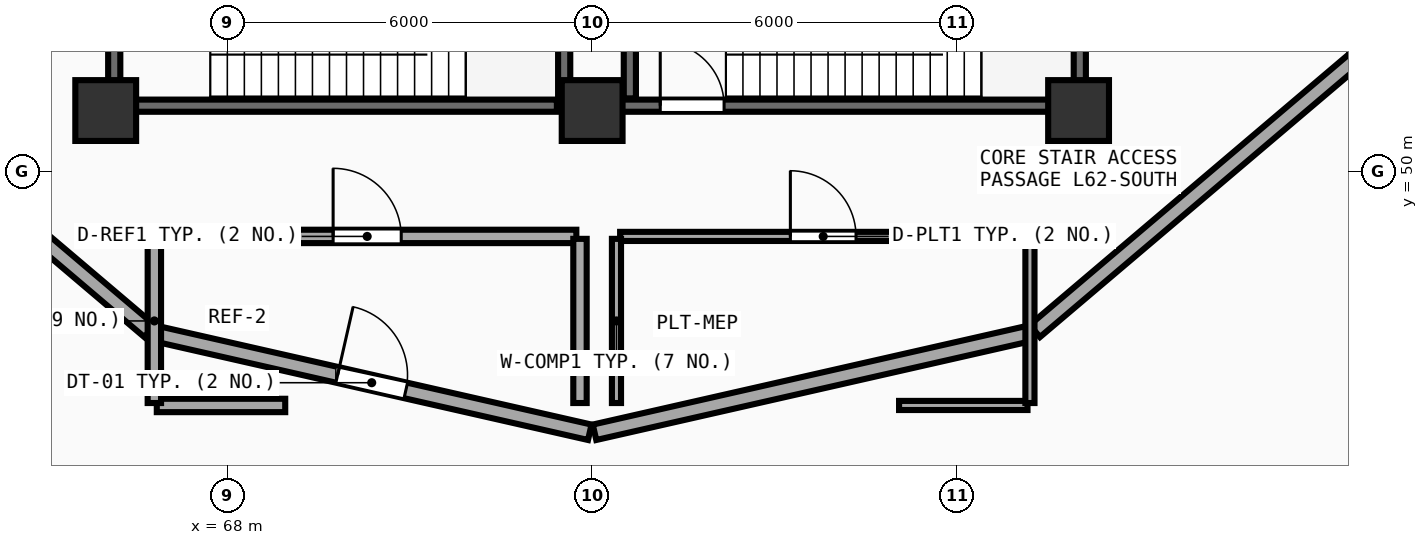
"""IFC4 building model, lengths in metres.
Left out: names, types, materials, properties, quantities, classifications, styles, units other than length and angle.
Written with IfcOpenShell. Run it as: python <this file> out.ifc"""

import sys

from ifc_helpers import new_model, si_unit, direction, frame, frame_2d, origin, origin_2d, place, context, subcontext, project, spatial, rectangle, extrude, element, fill, save


model = new_model("IFC4")
c1 = context("Model", 3, precision=1e-05, world=origin(), true_north=direction((0.0, 1.0)))
c2 = subcontext(c1, "Body", "Model", "MODEL_VIEW")
j1 = project(units=[si_unit("LENGTHUNIT", "METRE"), si_unit("PLANEANGLEUNIT", "RADIAN")], contexts=[c1])
p1 = place(None, origin())
s1 = spatial("IfcSite", under=j1, at=p1, CompositionType="ELEMENT")
p2 = place(p1, origin())
s2 = spatial("IfcBuilding", under=s1, at=p2, CompositionType="ELEMENT")
p3 = place(p2, frame((0.0, 0.0, 242.96)))
s3 = spatial("IfcBuildingStorey", under=s2, at=p3, CompositionType="ELEMENT", Elevation=242.96)
for number, where, z_axis, x_axis in (
    (1, (66.0, 51.0, 0.0), (0.0, 0.0, 1.0), (1.0, 0.0, 0.0)),
    (2, (74.0, 51.0, 0.0), (0.0, 0.0, 1.0), (1.0, 0.0, 0.0)),
    (3, (82.0, 51.0, 0.0), (0.0, 0.0, 1.0), (1.0, 0.0, 0.0)),
):
    element("IfcColumn", number, at=place(p3, frame(where, z_axis=z_axis, x_axis=x_axis)), inside=s3, PredefinedType="PILASTER", context=c2, shape_type="SweptSolid", body=[
        extrude(rectangle(XDim=1.0, YDim=1.0, at=origin_2d()), origin(), (0.0, 0.0, 1.0), 5.74),
    ])
p4 = place(p3, frame((61.473, 51.824, 0.0), z_axis=(0.0, 0.0, 1.0), x_axis=(0.762580748943, -0.646893037018, 0.0)))
e4 = element("IfcWall", 4, at=p4, inside=s3, PredefinedType="SOLIDWALL", context=c2, shape_type="SweptSolid", body=[
    extrude(rectangle(XDim=6.88, YDim=0.26, at=frame_2d((3.44, 0.0))), origin(), (0.0, 0.0, 1.0), 5.06),
])
p5 = place(p3, frame((66.789, 47.339, 0.0), z_axis=(0.0, 0.0, 1.0), x_axis=(0.975128290494, -0.221641189938, 0.0)))
e5 = element("IfcWall", 5, at=p5, inside=s3, PredefinedType="SOLIDWALL", context=c2, shape_type="SweptSolid", body=[
    extrude(rectangle(XDim=7.355, YDim=0.26, at=frame_2d((3.677, 0.0))), origin(), (0.0, 0.0, 1.0), 5.06),
])
p6 = place(p5, frame((3.102, 0.0, 0.0)))
e6 = element("IfcOpeningElement", 6, at=p6, cuts=e5, PredefinedType="OPENING", context=c2, shape_type="SweptSolid", body=[
    extrude(rectangle(XDim=1.15, YDim=2.15, at=frame_2d((0.575, 1.075))), frame((0.0, 0.14, 0.0), z_axis=(0.0, -1.0, 0.0), x_axis=(1.0, 0.0, 0.0)), (0.0, 0.0, 1.0), 0.28),
])
p7 = place(p3, frame((74.039, 45.709, 0.0), z_axis=(0.0, 0.0, 1.0), x_axis=(0.975128290494, 0.221641189938, 0.0)))
e7 = element("IfcWall", 7, at=p7, inside=s3, PredefinedType="SOLIDWALL", context=c2, shape_type="SweptSolid", body=[
    extrude(rectangle(XDim=7.355, YDim=0.26, at=frame_2d((3.677, 0.0))), origin(), (0.0, 0.0, 1.0), 5.06),
])
p8 = place(p3, frame((81.281, 47.374, 0.0), z_axis=(0.0, 0.0, 1.0), x_axis=(0.762580748943, 0.646893037018, 0.0)))
e8 = element("IfcWall", 8, at=p8, inside=s3, PredefinedType="SOLIDWALL", context=c2, shape_type="SweptSolid", body=[
    extrude(rectangle(XDim=6.88, YDim=0.26, at=frame_2d((3.44, 0.0))), origin(), (0.0, 0.0, 1.0), 5.06),
])
p9 = place(p3, frame((74.0, 51.08, 0.0), z_axis=(0.0, 0.0, 1.0), x_axis=(1.0, 0.0, 0.0)))
e9 = element("IfcWall", 9, at=p9, inside=s3, PredefinedType="SHEAR", context=c2, shape_type="SweptSolid", body=[
    extrude(rectangle(XDim=7.9, YDim=0.2, at=frame_2d((3.95, 0.0))), origin(), (0.0, 0.0, 1.0), 5.48),
])
p10 = place(p9, frame((1.12, 0.0, 0.0)))
e10 = element("IfcOpeningElement", 10, at=p10, cuts=e9, PredefinedType="OPENING", context=c2, shape_type="SweptSolid", body=[
    extrude(rectangle(XDim=1.05, YDim=2.1, at=frame_2d((0.525, 1.05))), frame((0.0, 0.11, 0.0), z_axis=(0.0, -1.0, 0.0), x_axis=(1.0, 0.0, 0.0)), (0.0, 0.0, 1.0), 0.22),
])
for number, where, z_axis, x_axis in (
    (11, (82.02, 51.2, 0.0), (0.0, 0.0, 1.0), (0.0, 1.0, 0.0)),
    (12, (74.62, 54.27, 0.0), (0.0, 0.0, 1.0), (0.0, -1.0, 0.0)),
):
    element("IfcWall", number, at=place(p3, frame(where, z_axis=z_axis, x_axis=x_axis)), inside=s3, PredefinedType="SHEAR", context=c2, shape_type="SweptSolid", body=[
        extrude(rectangle(XDim=3.07, YDim=0.2, at=frame_2d((1.535, 0.0))), origin(), (0.0, 0.0, 1.0), 5.48),
    ])
p11 = place(p3, frame((66.26, 51.08, 0.0), z_axis=(0.0, 0.0, 1.0), x_axis=(1.0, 0.0, 0.0)))
e13 = element("IfcWall", 13, at=p11, inside=s3, PredefinedType="SHEAR", context=c2, shape_type="SweptSolid", body=[
    extrude(rectangle(XDim=7.16, YDim=0.2, at=frame_2d((3.58, 0.0))), origin(), (0.0, 0.0, 1.0), 5.48),
])
p12 = place(p3, frame((73.54, 51.2, 0.0), z_axis=(0.0, 0.0, 1.0), x_axis=(0.0, 1.0, 0.0)))
e14 = element("IfcWall", 14, at=p12, inside=s3, PredefinedType="SHEAR", context=c2, shape_type="SweptSolid", body=[
    extrude(rectangle(XDim=3.07, YDim=0.2, at=frame_2d((1.535, 0.0))), origin(), (0.0, 0.0, 1.0), 5.48),
])
p13 = place(p3, frame((66.14, 54.27, 0.0), z_axis=(0.0, 0.0, 1.0), x_axis=(0.0, -1.0, 0.0)))
e15 = element("IfcWall", 15, at=p13, inside=s3, PredefinedType="SHEAR", context=c2, shape_type="SweptSolid", body=[
    extrude(rectangle(XDim=3.07, YDim=0.2, at=frame_2d((1.535, 0.0))), origin(), (0.0, 0.0, 1.0), 5.48),
])
p14 = place(p13, frame((1.01, 0.0, 0.0)))
e16 = element("IfcOpeningElement", 16, at=p14, cuts=e15, PredefinedType="OPENING", context=c2, shape_type="SweptSolid", body=[
    extrude(rectangle(XDim=1.05, YDim=2.1, at=frame_2d((0.525, 1.05))), frame((0.0, 0.11, 0.0), z_axis=(0.0, -1.0, 0.0), x_axis=(1.0, 0.0, 0.0)), (0.0, 0.0, 1.0), 0.22),
])
p15 = place(p3, frame((66.86, 48.93, 0.0), z_axis=(0.0, 0.0, 1.0), x_axis=(1.0, 0.0, 0.0)))
e17 = element("IfcWall", 17, at=p15, inside=s3, PredefinedType="SOLIDWALL", context=c2, shape_type="SweptSolid", body=[
    extrude(rectangle(XDim=6.88, YDim=0.22, at=frame_2d((3.44, 0.0))), origin(), (0.0, 0.0, 1.0), 5.065),
])
p16 = place(p15, frame((2.88, 0.0, 0.0)))
e18 = element("IfcOpeningElement", 18, at=p16, cuts=e17, PredefinedType="OPENING", context=c2, shape_type="SweptSolid", body=[
    extrude(rectangle(XDim=1.12, YDim=2.1, at=frame_2d((0.56, 1.05))), frame((0.0, 0.12, 0.0), z_axis=(0.0, -1.0, 0.0), x_axis=(1.0, 0.0, 0.0)), (0.0, 0.0, 1.0), 0.24),
])
p17 = place(p3, frame((74.46, 48.93, 0.0), z_axis=(0.0, 0.0, 1.0), x_axis=(1.0, 0.0, 0.0)))
e19 = element("IfcWall", 19, at=p17, inside=s3, PredefinedType="PARTITIONING", context=c2, shape_type="SweptSolid", body=[
    extrude(rectangle(XDim=6.68, YDim=0.15, at=frame_2d((3.34, 0.0))), origin(), (0.0, 0.0, 1.0), 5.065),
])
p18 = place(p17, frame((2.8, 0.0, 0.0)))
e20 = element("IfcOpeningElement", 20, at=p18, cuts=e19, PredefinedType="OPENING", context=c2, shape_type="SweptSolid", body=[
    extrude(rectangle(XDim=1.08, YDim=2.1, at=frame_2d((0.54, 1.05))), frame((0.0, 0.085, 0.0), z_axis=(0.0, -1.0, 0.0), x_axis=(1.0, 0.0, 0.0)), (0.0, 0.0, 1.0), 0.17),
])
p19 = place(p3, frame((66.84, 46.15, 0.0), z_axis=(0.0, 0.0, 1.0), x_axis=(1.0, 0.0, 0.0)))
e21 = element("IfcWall", 21, at=p19, inside=s3, PredefinedType="SOLIDWALL", context=c2, shape_type="SweptSolid", body=[
    extrude(rectangle(XDim=2.112, YDim=0.22, at=frame_2d((1.056, 0.0))), origin(), (0.0, 0.0, 1.0), 5.165),
])
p20 = place(p3, frame((73.8, 46.19, 0.0), z_axis=(0.0, 0.0, 1.0), x_axis=(0.0, 1.0, 0.0)))
e22 = element("IfcWall", 22, at=p20, inside=s3, PredefinedType="SOLIDWALL", context=c2, shape_type="SweptSolid", body=[
    extrude(rectangle(XDim=2.7, YDim=0.22, at=frame_2d((1.35, 0.0))), origin(), (0.0, 0.0, 1.0), 5.225),
])
p21 = place(p3, frame((66.8, 48.89, 0.0), z_axis=(0.0, 0.0, 1.0), x_axis=(0.0, -1.0, 0.0)))
e23 = element("IfcWall", 23, at=p21, inside=s3, PredefinedType="SOLIDWALL", context=c2, shape_type="SweptSolid", body=[
    extrude(rectangle(XDim=2.7, YDim=0.22, at=frame_2d((1.35, 0.0))), origin(), (0.0, 0.0, 1.0), 5.165),
])
p22 = place(p3, frame((79.048, 46.15, 0.0), z_axis=(0.0, 0.0, 1.0), x_axis=(1.0, 0.0, 0.0)))
e24 = element("IfcWall", 24, at=p22, inside=s3, PredefinedType="PARTITIONING", context=c2, shape_type="SweptSolid", body=[
    extrude(rectangle(XDim=2.112, YDim=0.15, at=frame_2d((1.056, 0.0))), origin(), (0.0, 0.0, 1.0), 5.165),
])
p23 = place(p3, frame((81.2, 46.19, 0.0), z_axis=(0.0, 0.0, 1.0), x_axis=(0.0, 1.0, 0.0)))
e25 = element("IfcWall", 25, at=p23, inside=s3, PredefinedType="PARTITIONING", context=c2, shape_type="SweptSolid", body=[
    extrude(rectangle(XDim=2.7, YDim=0.15, at=frame_2d((1.35, 0.0))), origin(), (0.0, 0.0, 1.0), 5.165),
])
p24 = place(p3, frame((74.4, 48.89, 0.0), z_axis=(0.0, 0.0, 1.0), x_axis=(0.0, -1.0, 0.0)))
e26 = element("IfcWall", 26, at=p24, inside=s3, PredefinedType="PARTITIONING", context=c2, shape_type="SweptSolid", body=[
    extrude(rectangle(XDim=2.7, YDim=0.15, at=frame_2d((1.35, 0.0))), origin(), (0.0, 0.0, 1.0), 5.225),
])
p25 = place(p6, frame((1.15, 0.0, 0.0), z_axis=(0.0, 0.0, 1.0), x_axis=(-1.0, 0.0, 0.0)))
e27 = element("IfcDoor", 27, at=p25, inside=s3, OperationType="SINGLE_SWING_RIGHT", PredefinedType="DOOR", context=c2, shape_type="SweptSolid", body=[
    extrude(rectangle(XDim=1.15, YDim=2.15, at=frame_2d((0.575, 1.075))), frame((0.0, 0.025, 0.0), z_axis=(0.0, -1.0, 0.0), x_axis=(1.0, 0.0, 0.0)), (0.0, 0.0, 1.0), 0.05),
])
fill(e6, e27)
p26 = place(p10, origin())
e28 = element("IfcDoor", 28, at=p26, inside=s3, OperationType="SINGLE_SWING_LEFT", PredefinedType="DOOR", context=c2, shape_type="SweptSolid", body=[
    extrude(rectangle(XDim=1.05, YDim=2.1, at=frame_2d((0.525, 1.05))), frame((0.0, 0.025, 0.0), z_axis=(0.0, -1.0, 0.0), x_axis=(1.0, 0.0, 0.0)), (0.0, 0.0, 1.0), 0.05),
])
fill(e10, e28)
p27 = place(p16, origin())
e29 = element("IfcDoor", 29, at=p27, inside=s3, OperationType="SINGLE_SWING_LEFT", PredefinedType="DOOR", context=c2, shape_type="SweptSolid", body=[
    extrude(rectangle(XDim=1.12, YDim=2.1, at=frame_2d((0.56, 1.05))), frame((0.0, 0.025, 0.0), z_axis=(0.0, -1.0, 0.0), x_axis=(1.0, 0.0, 0.0)), (0.0, 0.0, 1.0), 0.05),
])
fill(e18, e29)
p28 = place(p18, origin())
e30 = element("IfcDoor", 30, at=p28, inside=s3, OperationType="SINGLE_SWING_LEFT", PredefinedType="DOOR", context=c2, shape_type="SweptSolid", body=[
    extrude(rectangle(XDim=1.08, YDim=2.1, at=frame_2d((0.54, 1.05))), frame((0.0, 0.025, 0.0), z_axis=(0.0, -1.0, 0.0), x_axis=(1.0, 0.0, 0.0)), (0.0, 0.0, 1.0), 0.05),
])
fill(e20, e30)
save(model, sys.argv[1])
